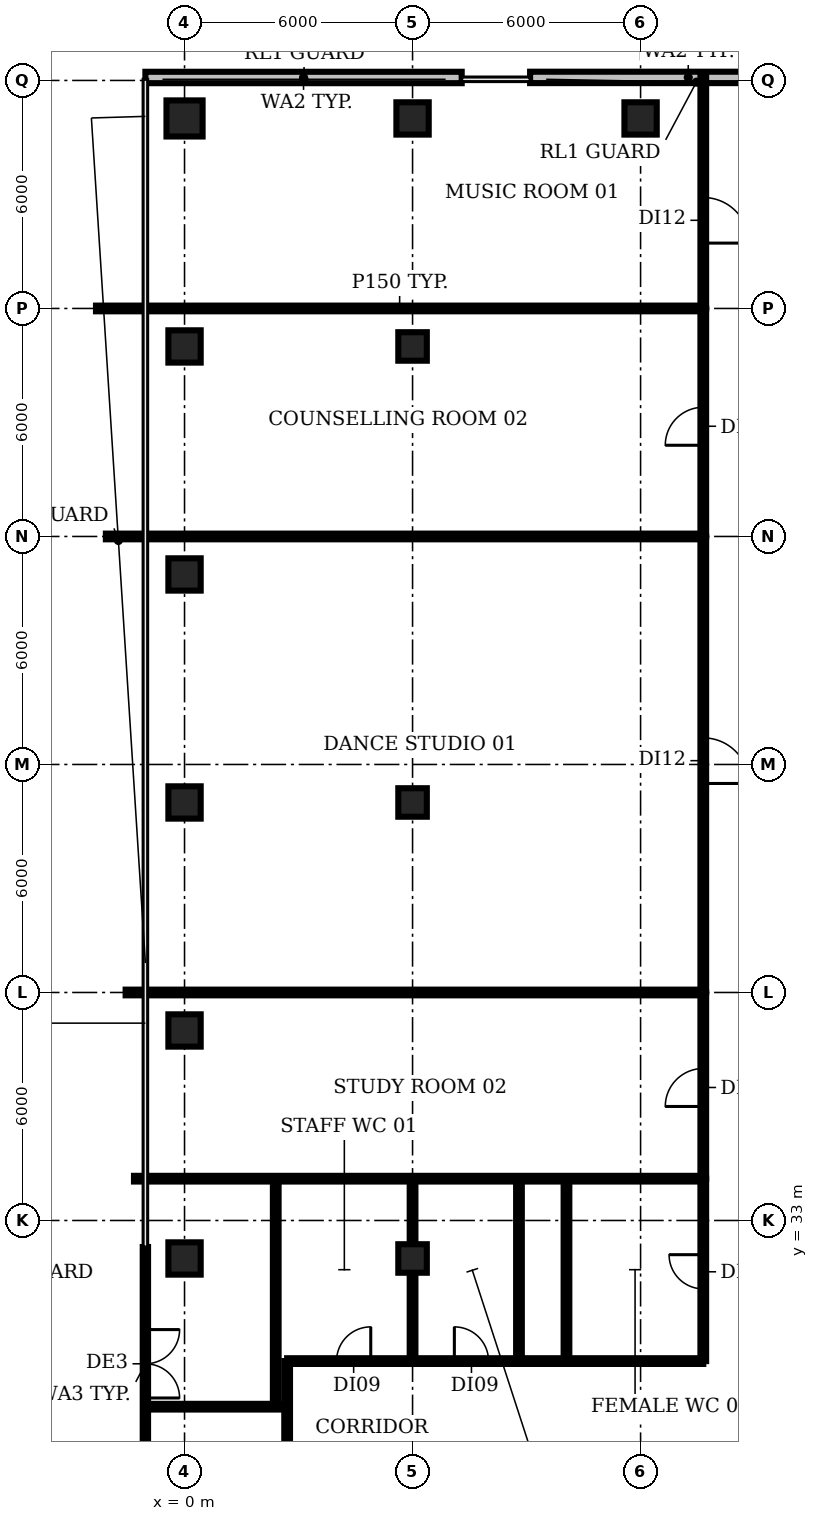
"""IFC4 building model, lengths in metres.
Left out: names, types, materials, properties, quantities, classifications, styles, units other than length and angle.
Written with IfcOpenShell. Run it as: python <this file> out.ifc"""

import sys

from ifc_helpers import new_model, si_unit, direction, frame, frame_2d, origin, origin_2d, place, context, subcontext, project, spatial, rectangle, circle, extrude, element, fill, save


model = new_model("IFC4")
c1 = context("Model", 3, precision=1e-05, world=origin(), true_north=direction((0.0, 1.0)))
c2 = subcontext(c1, "Body", "Model", "MODEL_VIEW")
j1 = project(units=[si_unit("LENGTHUNIT", "METRE"), si_unit("PLANEANGLEUNIT", "RADIAN")], contexts=[c1])
p1 = place(None, origin())
s1 = spatial("IfcSite", under=j1, at=p1, CompositionType="ELEMENT")
p2 = place(p1, origin())
s2 = spatial("IfcBuilding", under=s1, at=p2, CompositionType="ELEMENT")
p3 = place(p2, frame((0.0, 0.0, 180.2)))
s3 = spatial("IfcBuildingStorey", under=s2, at=p3, CompositionType="ELEMENT", Elevation=180.2)
for number, where, z_axis, x_axis in (
    (1, (0.0, 32.0, 0.0), (0.0, 0.0, 1.0), (1.0, 0.0, 0.0)),
    (2, (0.0, 38.0, 0.0), (0.0, 0.0, 1.0), (1.0, 0.0, 0.0)),
    (3, (0.0, 44.0, 0.0), (0.0, 0.0, 1.0), (1.0, 0.0, 0.0)),
    (4, (0.0, 50.0, 0.0), (0.0, 0.0, 1.0), (1.0, 0.0, 0.0)),
    (5, (0.0, 56.0, 0.0), (0.0, 0.0, 1.0), (1.0, 0.0, 0.0)),
):
    element("IfcColumn", number, at=place(p3, frame(where, z_axis=z_axis, x_axis=x_axis)), inside=s3, PredefinedType="COLUMN", context=c2, shape_type="SweptSolid", body=[
        extrude(rectangle(XDim=0.85, YDim=0.85, at=origin_2d()), origin(), (0.0, 0.0, 1.0), 3.85),
    ])
p4 = place(p3, frame((0.0, 62.0, 0.0), z_axis=(0.0, 0.0, 1.0), x_axis=(1.0, 0.0, 0.0)))
e6 = element("IfcColumn", 6, at=p4, inside=s3, PredefinedType="COLUMN", context=c2, shape_type="SweptSolid", body=[
    extrude(circle(Radius=0.475, at=origin_2d()), origin(), (0.0, 0.0, 1.0), 3.85),
])
for number, where, z_axis, x_axis in (
    (7, (6.0, 32.0, 0.0), (0.0, 0.0, 1.0), (1.0, 0.0, 0.0)),
    (8, (6.0, 44.0, 0.0), (0.0, 0.0, 1.0), (1.0, 0.0, 0.0)),
    (9, (6.0, 56.0, 0.0), (0.0, 0.0, 1.0), (1.0, 0.0, 0.0)),
):
    element("IfcColumn", number, at=place(p3, frame(where, z_axis=z_axis, x_axis=x_axis)), inside=s3, PredefinedType="COLUMN", context=c2, shape_type="SweptSolid", body=[
        extrude(rectangle(XDim=0.75, YDim=0.75, at=origin_2d()), origin(), (0.0, 0.0, 1.0), 3.85),
    ])
for number, where, z_axis, x_axis in (
    (10, (6.0, 62.0, 0.0), (0.0, 0.0, 1.0), (1.0, 0.0, 0.0)),
    (11, (12.0, 62.0, 0.0), (0.0, 0.0, 1.0), (1.0, 0.0, 0.0)),
):
    element("IfcColumn", number, at=place(p3, frame(where, z_axis=z_axis, x_axis=x_axis)), inside=s3, PredefinedType="COLUMN", context=c2, shape_type="SweptSolid", body=[
        extrude(rectangle(XDim=0.85, YDim=0.85, at=origin_2d()), origin(), (0.0, 0.0, 1.0), 3.85),
    ])
for number, where, z_axis, x_axis in (
    (12, (17.416, 63.08, 0.0), (0.0, 0.0, 1.0), (-1.0, 0.0, 0.0)),
    (13, (7.293, 63.078, 0.0), (0.0, 0.0, 1.0), (-1.0, 0.0, 0.0)),
):
    element("IfcWall", number, at=place(p3, frame(where, z_axis=z_axis, x_axis=x_axis)), inside=s3, PredefinedType="SOLIDWALL", context=c2, shape_type="SweptSolid", body=[
        extrude(rectangle(XDim=8.323, YDim=0.3, at=frame_2d((4.162, 0.0))), origin(), (0.0, 0.0, 1.0), 3.85),
    ])
p5 = place(p3, frame((-1.03, 32.302, 0.0), z_axis=(0.0, 0.0, 1.0), x_axis=(0.0, -1.0, 0.0)))
e14 = element("IfcWall", 14, at=p5, inside=s3, PredefinedType="SOLIDWALL", context=c2, shape_type="SweptSolid", body=[
    extrude(rectangle(XDim=6.146, YDim=0.14, at=frame_2d((3.073, 0.0))), origin(), (0.0, 0.0, 1.0), 3.85),
])
p6 = place(p5, frame((2.173, 0.0, 0.0)))
e15 = element("IfcOpeningElement", 15, at=p6, cuts=e14, PredefinedType="OPENING", context=c2, shape_type="SweptSolid", body=[
    extrude(rectangle(XDim=1.8, YDim=2.4, at=frame_2d((0.9, 1.2))), frame((0.0, 0.08, 0.0), z_axis=(0.0, -1.0, 0.0), x_axis=(1.0, 0.0, 0.0)), (0.0, 0.0, 1.0), 0.16),
])
p7 = place(p3, frame((-2.33, 57.0, 0.0), z_axis=(0.0, 0.0, 1.0), x_axis=(1.0, 0.0, 0.0)))
e16 = element("IfcWall", 16, at=p7, inside=s3, PredefinedType="PARTITIONING", context=c2, shape_type="SweptSolid", body=[
    extrude(rectangle(XDim=15.98, YDim=0.15, at=frame_2d((7.99, 0.0))), origin(), (0.0, 0.0, 1.0), 2.88),
])
p8 = place(p3, frame((-2.07, 51.0, 0.0), z_axis=(0.0, 0.0, 1.0), x_axis=(1.0, 0.0, 0.0)))
e17 = element("IfcWall", 17, at=p8, inside=s3, PredefinedType="PARTITIONING", context=c2, shape_type="SweptSolid", body=[
    extrude(rectangle(XDim=15.72, YDim=0.15, at=frame_2d((7.86, 0.0))), origin(), (0.0, 0.0, 1.0), 2.88),
])
p9 = place(p3, frame((-1.55, 39.0, 0.0), z_axis=(0.0, 0.0, 1.0), x_axis=(1.0, 0.0, 0.0)))
e18 = element("IfcWall", 18, at=p9, inside=s3, PredefinedType="PARTITIONING", context=c2, shape_type="SweptSolid", body=[
    extrude(rectangle(XDim=15.2, YDim=0.15, at=frame_2d((7.6, 0.0))), origin(), (0.0, 0.0, 1.0), 2.88),
])
p10 = place(p3, frame((-1.33, 34.1, 0.0), z_axis=(0.0, 0.0, 1.0), x_axis=(1.0, 0.0, 0.0)))
e19 = element("IfcWall", 19, at=p10, inside=s3, PredefinedType="PARTITIONING", context=c2, shape_type="SweptSolid", body=[
    extrude(rectangle(XDim=14.98, YDim=0.15, at=frame_2d((7.49, 0.0))), origin(), (0.0, 0.0, 1.0), 2.88),
])
p11 = place(p3, frame((-0.97, 28.1, 0.0), z_axis=(0.0, 0.0, 1.0), x_axis=(1.0, 0.0, 0.0)))
e20 = element("IfcWall", 20, at=p11, inside=s3, PredefinedType="PARTITIONING", context=c2, shape_type="SweptSolid", body=[
    extrude(rectangle(XDim=3.67, YDim=0.15, at=frame_2d((1.835, 0.0))), origin(), (0.0, 0.0, 1.0), 2.88),
])
p12 = place(p3, frame((2.4, 28.1, 0.0), z_axis=(0.0, 0.0, 1.0), x_axis=(0.0, 1.0, 0.0)))
e21 = element("IfcWall", 21, at=p12, inside=s3, PredefinedType="PARTITIONING", context=c2, shape_type="SweptSolid", body=[
    extrude(rectangle(XDim=6.0, YDim=0.15, at=frame_2d((3.0, 0.0))), origin(), (0.0, 0.0, 1.0), 2.88),
])
p13 = place(p3, frame((2.7, 25.4, 0.0), z_axis=(0.0, 0.0, 1.0), x_axis=(0.0, 1.0, 0.0)))
e22 = element("IfcWall", 22, at=p13, inside=s3, PredefinedType="PARTITIONING", context=c2, shape_type="SweptSolid", body=[
    extrude(rectangle(XDim=3.9, YDim=0.15, at=frame_2d((1.95, 0.0))), origin(), (0.0, 0.0, 1.0), 2.88),
])
p14 = place(p3, frame((2.7, 29.3, 0.0), z_axis=(0.0, 0.0, 1.0), x_axis=(1.0, 0.0, 0.0)))
e23 = element("IfcWall", 23, at=p14, inside=s3, PredefinedType="PARTITIONING", context=c2, shape_type="SweptSolid", body=[
    extrude(rectangle(XDim=3.3, YDim=0.15, at=frame_2d((1.65, 0.0))), origin(), (0.0, 0.0, 1.0), 2.88),
])
p15 = place(p14, frame((1.3, 0.0, 0.0)))
e24 = element("IfcOpeningElement", 24, at=p15, cuts=e23, PredefinedType="OPENING", context=c2, shape_type="SweptSolid", body=[
    extrude(rectangle(XDim=0.9, YDim=2.1, at=frame_2d((0.45, 1.05))), frame((0.0, 0.085, 0.0), z_axis=(0.0, -1.0, 0.0), x_axis=(1.0, 0.0, 0.0)), (0.0, 0.0, 1.0), 0.17),
])
p16 = place(p3, frame((6.0, 29.3, 0.0), z_axis=(0.0, 0.0, 1.0), x_axis=(0.0, 1.0, 0.0)))
e25 = element("IfcWall", 25, at=p16, inside=s3, PredefinedType="PARTITIONING", context=c2, shape_type="SweptSolid", body=[
    extrude(rectangle(XDim=4.8, YDim=0.15, at=frame_2d((2.4, 0.0))), origin(), (0.0, 0.0, 1.0), 2.88),
])
p17 = place(p3, frame((6.0, 29.3, 0.0), z_axis=(0.0, 0.0, 1.0), x_axis=(1.0, 0.0, 0.0)))
e26 = element("IfcWall", 26, at=p17, inside=s3, PredefinedType="PARTITIONING", context=c2, shape_type="SweptSolid", body=[
    extrude(rectangle(XDim=2.8, YDim=0.15, at=frame_2d((1.4, 0.0))), origin(), (0.0, 0.0, 1.0), 2.88),
])
p18 = place(p17, frame((1.1, 0.0, 0.0)))
e27 = element("IfcOpeningElement", 27, at=p18, cuts=e26, PredefinedType="OPENING", context=c2, shape_type="SweptSolid", body=[
    extrude(rectangle(XDim=0.9, YDim=2.1, at=frame_2d((0.45, 1.05))), frame((0.0, 0.085, 0.0), z_axis=(0.0, -1.0, 0.0), x_axis=(1.0, 0.0, 0.0)), (0.0, 0.0, 1.0), 0.17),
])
p19 = place(p3, frame((8.8, 29.3, 0.0), z_axis=(0.0, 0.0, 1.0), x_axis=(0.0, 1.0, 0.0)))
e28 = element("IfcWall", 28, at=p19, inside=s3, PredefinedType="PARTITIONING", context=c2, shape_type="SweptSolid", body=[
    extrude(rectangle(XDim=4.8, YDim=0.15, at=frame_2d((2.4, 0.0))), origin(), (0.0, 0.0, 1.0), 2.88),
])
p20 = place(p3, frame((8.8, 29.3, 0.0), z_axis=(0.0, 0.0, 1.0), x_axis=(1.0, 0.0, 0.0)))
e29 = element("IfcWall", 29, at=p20, inside=s3, PredefinedType="PARTITIONING", context=c2, shape_type="SweptSolid", body=[
    extrude(rectangle(XDim=4.85, YDim=0.15, at=frame_2d((2.425, 0.0))), origin(), (0.0, 0.0, 1.0), 2.88),
])
p21 = place(p3, frame((10.05, 29.3, 0.0), z_axis=(0.0, 0.0, 1.0), x_axis=(0.0, 1.0, 0.0)))
e30 = element("IfcWall", 30, at=p21, inside=s3, PredefinedType="PARTITIONING", context=c2, shape_type="SweptSolid", body=[
    extrude(rectangle(XDim=4.8, YDim=0.15, at=frame_2d((2.4, 0.0))), origin(), (0.0, 0.0, 1.0), 2.88),
])
p22 = place(p3, frame((13.65, 29.3, 0.0), z_axis=(0.0, 0.0, 1.0), x_axis=(0.0, 1.0, 0.0)))
e31 = element("IfcWall", 31, at=p22, inside=s3, PredefinedType="PARTITIONING", context=c2, shape_type="SweptSolid", body=[
    extrude(rectangle(XDim=4.8, YDim=0.15, at=frame_2d((2.4, 0.0))), origin(), (0.0, 0.0, 1.0), 2.88),
])
p23 = place(p22, frame((1.9, 0.0, 0.0)))
e32 = element("IfcOpeningElement", 32, at=p23, cuts=e31, PredefinedType="OPENING", context=c2, shape_type="SweptSolid", body=[
    extrude(rectangle(XDim=0.9, YDim=2.1, at=frame_2d((0.45, 1.05))), frame((0.0, 0.085, 0.0), z_axis=(0.0, -1.0, 0.0), x_axis=(1.0, 0.0, 0.0)), (0.0, 0.0, 1.0), 0.17),
])
p24 = place(p3, frame((13.65, 34.1, 0.0), z_axis=(0.0, 0.0, 1.0), x_axis=(0.0, 1.0, 0.0)))
e33 = element("IfcWall", 33, at=p24, inside=s3, PredefinedType="PARTITIONING", context=c2, shape_type="SweptSolid", body=[
    extrude(rectangle(XDim=4.9, YDim=0.15, at=frame_2d((2.45, 0.0))), origin(), (0.0, 0.0, 1.0), 2.88),
])
p25 = place(p24, frame((1.9, 0.0, 0.0)))
e34 = element("IfcOpeningElement", 34, at=p25, cuts=e33, PredefinedType="OPENING", context=c2, shape_type="SweptSolid", body=[
    extrude(rectangle(XDim=1.0, YDim=2.1, at=frame_2d((0.5, 1.05))), frame((0.0, 0.085, 0.0), z_axis=(0.0, -1.0, 0.0), x_axis=(1.0, 0.0, 0.0)), (0.0, 0.0, 1.0), 0.17),
])
p26 = place(p3, frame((13.65, 51.0, 0.0), z_axis=(0.0, 0.0, 1.0), x_axis=(0.0, -1.0, 0.0)))
e35 = element("IfcWall", 35, at=p26, inside=s3, PredefinedType="PARTITIONING", context=c2, shape_type="SweptSolid", body=[
    extrude(rectangle(XDim=12.0, YDim=0.15, at=frame_2d((6.0, 0.0))), origin(), (0.0, 0.0, 1.0), 2.88),
])
p27 = place(p26, frame((5.3, 0.0, 0.0)))
e36 = element("IfcOpeningElement", 36, at=p27, cuts=e35, PredefinedType="OPENING", context=c2, shape_type="SweptSolid", body=[
    extrude(rectangle(XDim=1.2, YDim=2.1, at=frame_2d((0.6, 1.05))), frame((0.0, 0.085, 0.0), z_axis=(0.0, -1.0, 0.0), x_axis=(1.0, 0.0, 0.0)), (0.0, 0.0, 1.0), 0.17),
])
p28 = place(p3, frame((13.65, 51.0, 0.0), z_axis=(0.0, 0.0, 1.0), x_axis=(0.0, 1.0, 0.0)))
e37 = element("IfcWall", 37, at=p28, inside=s3, PredefinedType="PARTITIONING", context=c2, shape_type="SweptSolid", body=[
    extrude(rectangle(XDim=6.0, YDim=0.15, at=frame_2d((3.0, 0.0))), origin(), (0.0, 0.0, 1.0), 2.88),
])
p29 = place(p28, frame((2.4, 0.0, 0.0)))
e38 = element("IfcOpeningElement", 38, at=p29, cuts=e37, PredefinedType="OPENING", context=c2, shape_type="SweptSolid", body=[
    extrude(rectangle(XDim=1.0, YDim=2.1, at=frame_2d((0.5, 1.05))), frame((0.0, 0.085, 0.0), z_axis=(0.0, -1.0, 0.0), x_axis=(1.0, 0.0, 0.0)), (0.0, 0.0, 1.0), 0.17),
])
p30 = place(p3, frame((13.65, 63.09, 0.0), z_axis=(0.0, 0.0, 1.0), x_axis=(0.0, -1.0, 0.0)))
e39 = element("IfcWall", 39, at=p30, inside=s3, PredefinedType="PARTITIONING", context=c2, shape_type="SweptSolid", body=[
    extrude(rectangle(XDim=6.09, YDim=0.15, at=frame_2d((3.045, 0.0))), origin(), (0.0, 0.0, 1.0), 2.88),
])
p31 = place(p30, frame((3.17, 0.0, 0.0)))
e40 = element("IfcOpeningElement", 40, at=p31, cuts=e39, PredefinedType="OPENING", context=c2, shape_type="SweptSolid", body=[
    extrude(rectangle(XDim=1.2, YDim=2.1, at=frame_2d((0.6, 1.05))), frame((0.0, 0.085, 0.0), z_axis=(0.0, -1.0, 0.0), x_axis=(1.0, 0.0, 0.0)), (0.0, 0.0, 1.0), 0.17),
])
p32 = place(p6, origin())
e41 = element("IfcDoor", 41, at=p32, inside=s3, OperationType="DOUBLE_DOOR_DOUBLE_SWING", PredefinedType="DOOR", context=c2, shape_type="SweptSolid", body=[
    extrude(rectangle(XDim=1.8, YDim=2.4, at=frame_2d((0.9, 1.2))), frame((0.0, 0.025, 0.0), z_axis=(0.0, -1.0, 0.0), x_axis=(1.0, 0.0, 0.0)), (0.0, 0.0, 1.0), 0.05),
])
fill(e15, e41)
p33 = place(p15, origin())
e42 = element("IfcDoor", 42, at=p33, inside=s3, OperationType="SINGLE_SWING_RIGHT", PredefinedType="DOOR", context=c2, shape_type="SweptSolid", body=[
    extrude(rectangle(XDim=0.9, YDim=2.1, at=frame_2d((0.45, 1.05))), frame((0.0, 0.025, 0.0), z_axis=(0.0, -1.0, 0.0), x_axis=(1.0, 0.0, 0.0)), (0.0, 0.0, 1.0), 0.05),
])
fill(e24, e42)
p34 = place(p18, origin())
e43 = element("IfcDoor", 43, at=p34, inside=s3, OperationType="SINGLE_SWING_LEFT", PredefinedType="DOOR", context=c2, shape_type="SweptSolid", body=[
    extrude(rectangle(XDim=0.9, YDim=2.1, at=frame_2d((0.45, 1.05))), frame((0.0, 0.025, 0.0), z_axis=(0.0, -1.0, 0.0), x_axis=(1.0, 0.0, 0.0)), (0.0, 0.0, 1.0), 0.05),
])
fill(e27, e43)
p35 = place(p23, origin())
e44 = element("IfcDoor", 44, at=p35, inside=s3, OperationType="SINGLE_SWING_RIGHT", PredefinedType="DOOR", context=c2, shape_type="SweptSolid", body=[
    extrude(rectangle(XDim=0.9, YDim=2.1, at=frame_2d((0.45, 1.05))), frame((0.0, 0.025, 0.0), z_axis=(0.0, -1.0, 0.0), x_axis=(1.0, 0.0, 0.0)), (0.0, 0.0, 1.0), 0.05),
])
fill(e32, e44)
p36 = place(p25, origin())
e45 = element("IfcDoor", 45, at=p36, inside=s3, OperationType="SINGLE_SWING_LEFT", PredefinedType="DOOR", context=c2, shape_type="SweptSolid", body=[
    extrude(rectangle(XDim=1.0, YDim=2.1, at=frame_2d((0.5, 1.05))), frame((0.0, 0.025, 0.0), z_axis=(0.0, -1.0, 0.0), x_axis=(1.0, 0.0, 0.0)), (0.0, 0.0, 1.0), 0.05),
])
fill(e34, e45)
p37 = place(p27, origin())
e46 = element("IfcDoor", 46, at=p37, inside=s3, OperationType="SINGLE_SWING_RIGHT", PredefinedType="DOOR", context=c2, shape_type="SweptSolid", body=[
    extrude(rectangle(XDim=1.2, YDim=2.1, at=frame_2d((0.6, 1.05))), frame((0.0, 0.025, 0.0), z_axis=(0.0, -1.0, 0.0), x_axis=(1.0, 0.0, 0.0)), (0.0, 0.0, 1.0), 0.05),
])
fill(e36, e46)
p38 = place(p29, origin())
e47 = element("IfcDoor", 47, at=p38, inside=s3, OperationType="SINGLE_SWING_LEFT", PredefinedType="DOOR", context=c2, shape_type="SweptSolid", body=[
    extrude(rectangle(XDim=1.0, YDim=2.1, at=frame_2d((0.5, 1.05))), frame((0.0, 0.025, 0.0), z_axis=(0.0, -1.0, 0.0), x_axis=(1.0, 0.0, 0.0)), (0.0, 0.0, 1.0), 0.05),
])
fill(e38, e47)
p39 = place(p31, origin())
e48 = element("IfcDoor", 48, at=p39, inside=s3, OperationType="SINGLE_SWING_RIGHT", PredefinedType="DOOR", context=c2, shape_type="SweptSolid", body=[
    extrude(rectangle(XDim=1.2, YDim=2.1, at=frame_2d((0.6, 1.05))), frame((0.0, 0.025, 0.0), z_axis=(0.0, -1.0, 0.0), x_axis=(1.0, 0.0, 0.0)), (0.0, 0.0, 1.0), 0.05),
])
fill(e40, e48)
save(model, sys.argv[1])
